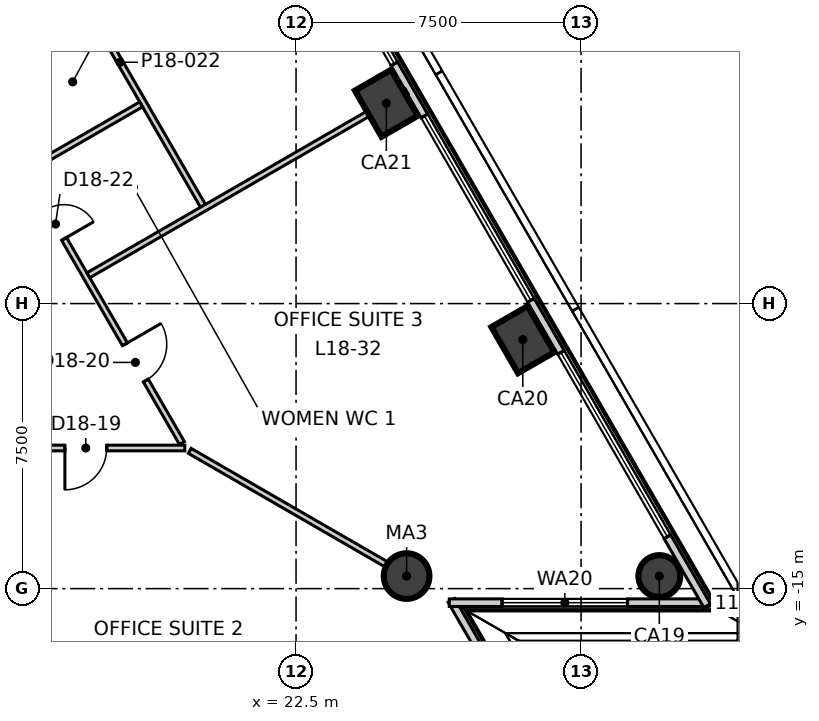
"""IFC4 building model, lengths in metres.
Left out: names, types, materials, properties, quantities, classifications, styles, units other than length and angle.
Written with IfcOpenShell. Run it as: python <this file> out.ifc"""

import sys

from ifc_helpers import new_model, si_unit, direction, frame, frame_2d, origin, origin_2d, place, context, subcontext, project, spatial, rectangle, circle, extrude, element, fill, save


model = new_model("IFC4")
c1 = context("Model", 3, precision=1e-05, world=origin(), true_north=direction((0.0, 1.0)))
c2 = subcontext(c1, "Body", "Model", "MODEL_VIEW")
j1 = project(units=[si_unit("LENGTHUNIT", "METRE"), si_unit("PLANEANGLEUNIT", "RADIAN")], contexts=[c1])
p1 = place(None, origin())
s1 = spatial("IfcSite", under=j1, at=p1, CompositionType="ELEMENT")
p2 = place(p1, origin())
s2 = spatial("IfcBuilding", under=s1, at=p2, CompositionType="ELEMENT")
p3 = place(p2, frame((0.0, 0.0, 83.3)))
s3 = spatial("IfcBuildingStorey", under=s2, at=p3, CompositionType="ELEMENT", Elevation=83.3)
p4 = place(p3, frame((32.059, -14.67, -0.3), z_axis=(0.0, 0.0, 1.0), x_axis=(-0.5, 0.866025403784, 0.0)))
e1 = element("IfcColumn", 1, at=p4, inside=s3, PredefinedType="COLUMN", context=c2, shape_type="SweptSolid", body=[
    extrude(circle(Radius=0.55, at=origin_2d()), origin(), (0.0, 0.0, 1.0), 4.0),
])
for number, where, z_axis, x_axis in (
    (2, (28.467, -8.449, -0.3), (0.0, 0.0, 1.0), (-0.5, 0.866, 0.0)),
    (3, (24.876, -2.228, -0.3), (0.0, 0.0, 1.0), (-0.5, 0.866, 0.0)),
):
    element("IfcColumn", number, at=place(p3, frame(where, z_axis=z_axis, x_axis=x_axis)), inside=s3, PredefinedType="COLUMN", context=c2, shape_type="SweptSolid", body=[
        extrude(rectangle(XDim=1.4, YDim=1.1, at=origin_2d()), origin(), (0.0, 0.0, 1.0), 4.0),
    ])
p5 = place(p3, frame((25.409, -14.67, -0.3), z_axis=(0.0, 0.0, 1.0), x_axis=(1.0, 0.0, 0.0)))
e4 = element("IfcColumn", 4, at=p5, inside=s3, PredefinedType="COLUMN", context=c2, shape_type="SweptSolid", body=[
    extrude(circle(Radius=0.6, at=origin_2d()), origin(), (0.0, 0.0, 1.0), 4.0),
])
p6 = place(p3, frame((29.992, -21.207, 0.0), z_axis=(0.0, 0.0, 1.0), x_axis=(-0.499983120418, 0.866035148996, 0.0)))
e5 = element("IfcWall", 5, at=p6, inside=s3, PredefinedType="ELEMENTEDWALL", context=c2, shape_type="SweptSolid", body=[
    extrude(rectangle(XDim=6.81, YDim=0.2, at=frame_2d((3.405, 0.0))), origin(), (0.0, 0.0, 1.0), 3.7),
])
p7 = place(p6, frame((1.99, 0.0, 0.9)))
e6 = element("IfcOpeningElement", 6, at=p7, cuts=e5, PredefinedType="OPENING", context=c2, shape_type="SweptSolid", body=[
    extrude(rectangle(XDim=3.3, YDim=2.5, at=frame_2d((1.65, 1.25))), frame((0.0, 0.11, 0.0), z_axis=(0.0, -1.0, 0.0), x_axis=(1.0, 0.0, 0.0)), (0.0, 0.0, 1.0), 0.22),
])
p8 = place(p3, frame((26.532, -15.37, 0.0), z_axis=(0.0, 0.0, 1.0), x_axis=(1.0, 0.0, 0.0)))
e7 = element("IfcWall", 7, at=p8, inside=s3, PredefinedType="ELEMENTEDWALL", context=c2, shape_type="SweptSolid", body=[
    extrude(rectangle(XDim=6.81, YDim=0.2, at=frame_2d((3.405, 0.0))), origin(), (0.0, 0.0, 1.0), 3.7),
])
p9 = place(p8, frame((1.39, 0.0, 0.9)))
e8 = element("IfcOpeningElement", 8, at=p9, cuts=e7, PredefinedType="OPENING", context=c2, shape_type="SweptSolid", body=[
    extrude(rectangle(XDim=3.3, YDim=2.5, at=frame_2d((1.65, 1.25))), frame((0.0, 0.11, 0.0), z_axis=(0.0, -1.0, 0.0), x_axis=(1.0, 0.0, 0.0)), (0.0, 0.0, 1.0), 0.22),
])
p10 = place(p3, frame((33.317, -15.448, 0.0), z_axis=(0.0, 0.0, 1.0), x_axis=(-0.499999874703, 0.866025476125, 0.0)))
e9 = element("IfcWall", 9, at=p10, inside=s3, PredefinedType="ELEMENTEDWALL", context=c2, shape_type="SweptSolid", body=[
    extrude(rectangle(XDim=60.054, YDim=0.2, at=frame_2d((30.027, 0.0))), origin(), (0.0, 0.0, 1.0), 3.7),
])
p11 = place(p10, frame((2.094, 0.0, 0.9)))
e10 = element("IfcOpeningElement", 10, at=p11, cuts=e9, PredefinedType="OPENING", context=c2, shape_type="SweptSolid", body=[
    extrude(rectangle(XDim=5.6, YDim=2.5, at=frame_2d((2.8, 1.25))), frame((0.0, 0.11, 0.0), z_axis=(0.0, -1.0, 0.0), x_axis=(1.0, 0.0, 0.0)), (0.0, 0.0, 1.0), 0.22),
])
p12 = place(p10, frame((9.278, 0.0, 0.9)))
e11 = element("IfcOpeningElement", 11, at=p12, cuts=e9, PredefinedType="OPENING", context=c2, shape_type="SweptSolid", body=[
    extrude(rectangle(XDim=5.6, YDim=2.5, at=frame_2d((2.8, 1.25))), frame((0.0, 0.11, 0.0), z_axis=(0.0, -1.0, 0.0), x_axis=(1.0, 0.0, 0.0)), (0.0, 0.0, 1.0), 0.22),
])
p13 = place(p10, frame((16.462, 0.0, 0.9)))
e12 = element("IfcOpeningElement", 12, at=p13, cuts=e9, PredefinedType="OPENING", context=c2, shape_type="SweptSolid", body=[
    extrude(rectangle(XDim=5.6, YDim=2.5, at=frame_2d((2.8, 1.25))), frame((0.0, 0.11, 0.0), z_axis=(0.0, -1.0, 0.0), x_axis=(1.0, 0.0, 0.0)), (0.0, 0.0, 1.0), 0.22),
])
p14 = place(p10, frame((23.645, 0.0, 0.9)))
e13 = element("IfcOpeningElement", 13, at=p14, cuts=e9, PredefinedType="OPENING", context=c2, shape_type="SweptSolid", body=[
    extrude(rectangle(XDim=5.6, YDim=2.5, at=frame_2d((2.8, 1.25))), frame((0.0, 0.11, 0.0), z_axis=(0.0, -1.0, 0.0), x_axis=(1.0, 0.0, 0.0)), (0.0, 0.0, 1.0), 0.22),
])
p15 = place(p10, frame((30.829, 0.0, 0.9)))
e14 = element("IfcOpeningElement", 14, at=p15, cuts=e9, PredefinedType="OPENING", context=c2, shape_type="SweptSolid", body=[
    extrude(rectangle(XDim=5.6, YDim=2.5, at=frame_2d((2.8, 1.25))), frame((0.0, 0.11, 0.0), z_axis=(0.0, -1.0, 0.0), x_axis=(1.0, 0.0, 0.0)), (0.0, 0.0, 1.0), 0.22),
])
p16 = place(p10, frame((38.012, 0.0, 0.9)))
e15 = element("IfcOpeningElement", 15, at=p16, cuts=e9, PredefinedType="OPENING", context=c2, shape_type="SweptSolid", body=[
    extrude(rectangle(XDim=5.6, YDim=2.5, at=frame_2d((2.8, 1.25))), frame((0.0, 0.11, 0.0), z_axis=(0.0, -1.0, 0.0), x_axis=(1.0, 0.0, 0.0)), (0.0, 0.0, 1.0), 0.22),
])
p17 = place(p10, frame((45.196, 0.0, 0.9)))
e16 = element("IfcOpeningElement", 16, at=p17, cuts=e9, PredefinedType="OPENING", context=c2, shape_type="SweptSolid", body=[
    extrude(rectangle(XDim=5.6, YDim=2.5, at=frame_2d((2.8, 1.25))), frame((0.0, 0.11, 0.0), z_axis=(0.0, -1.0, 0.0), x_axis=(1.0, 0.0, 0.0)), (0.0, 0.0, 1.0), 0.22),
])
p18 = place(p10, frame((52.379, 0.0, 0.9)))
e17 = element("IfcOpeningElement", 17, at=p18, cuts=e9, PredefinedType="OPENING", context=c2, shape_type="SweptSolid", body=[
    extrude(rectangle(XDim=5.6, YDim=2.5, at=frame_2d((2.8, 1.25))), frame((0.0, 0.11, 0.0), z_axis=(0.0, -1.0, 0.0), x_axis=(1.0, 0.0, 0.0)), (0.0, 0.0, 1.0), 0.22),
])
p19 = place(p3, frame((-19.422, -11.3, 0.0), z_axis=(0.0, 0.0, 1.0), x_axis=(1.0, 0.0, 0.0)))
e18 = element("IfcWall", 18, at=p19, inside=s3, PredefinedType="PARTITIONING", context=c2, shape_type="SweptSolid", body=[
    extrude(rectangle(XDim=38.994, YDim=0.15, at=frame_2d((19.497, 0.0))), origin(), (0.0, 0.0, 1.0), 3.7),
])
p20 = place(p19, frame((1.9, 0.0, 0.0)))
e19 = element("IfcOpeningElement", 19, at=p20, cuts=e18, PredefinedType="OPENING", context=c2, shape_type="SweptSolid", body=[
    extrude(rectangle(XDim=1.1, YDim=2.1, at=frame_2d((0.55, 1.05))), frame((0.0, 0.085, 0.0), z_axis=(0.0, -1.0, 0.0), x_axis=(1.0, 0.0, 0.0)), (0.0, 0.0, 1.0), 0.17),
])
p21 = place(p19, frame((11.705, 0.0, 0.0)))
e20 = element("IfcOpeningElement", 20, at=p21, cuts=e18, PredefinedType="OPENING", context=c2, shape_type="SweptSolid", body=[
    extrude(rectangle(XDim=1.1, YDim=2.1, at=frame_2d((0.55, 1.05))), frame((0.0, 0.085, 0.0), z_axis=(0.0, -1.0, 0.0), x_axis=(1.0, 0.0, 0.0)), (0.0, 0.0, 1.0), 0.17),
])
p22 = place(p19, frame((6.405, 0.0, 0.0)))
e21 = element("IfcOpeningElement", 21, at=p22, cuts=e18, PredefinedType="OPENING", context=c2, shape_type="SweptSolid", body=[
    extrude(rectangle(XDim=0.9, YDim=2.1, at=frame_2d((0.45, 1.05))), frame((0.0, 0.085, 0.0), z_axis=(0.0, -1.0, 0.0), x_axis=(1.0, 0.0, 0.0)), (0.0, 0.0, 1.0), 0.17),
])
p23 = place(p19, frame((9.405, 0.0, 0.0)))
e22 = element("IfcOpeningElement", 22, at=p23, cuts=e18, PredefinedType="OPENING", context=c2, shape_type="SweptSolid", body=[
    extrude(rectangle(XDim=0.9, YDim=2.1, at=frame_2d((0.45, 1.05))), frame((0.0, 0.085, 0.0), z_axis=(0.0, -1.0, 0.0), x_axis=(1.0, 0.0, 0.0)), (0.0, 0.0, 1.0), 0.17),
])
p24 = place(p19, frame((22.472, 0.0, 0.0)))
e23 = element("IfcOpeningElement", 23, at=p24, cuts=e18, PredefinedType="OPENING", context=c2, shape_type="SweptSolid", body=[
    extrude(rectangle(XDim=1.0, YDim=2.1, at=frame_2d((0.5, 1.05))), frame((0.0, 0.085, 0.0), z_axis=(0.0, -1.0, 0.0), x_axis=(1.0, 0.0, 0.0)), (0.0, 0.0, 1.0), 0.17),
])
p25 = place(p19, frame((29.656, 0.0, 0.0)))
e24 = element("IfcOpeningElement", 24, at=p25, cuts=e18, PredefinedType="OPENING", context=c2, shape_type="SweptSolid", body=[
    extrude(rectangle(XDim=1.0, YDim=2.1, at=frame_2d((0.5, 1.05))), frame((0.0, 0.085, 0.0), z_axis=(0.0, -1.0, 0.0), x_axis=(1.0, 0.0, 0.0)), (0.0, 0.0, 1.0), 0.17),
])
p26 = place(p19, frame((35.839, 0.0, 0.0)))
e25 = element("IfcOpeningElement", 25, at=p26, cuts=e18, PredefinedType="OPENING", context=c2, shape_type="SweptSolid", body=[
    extrude(rectangle(XDim=1.1, YDim=2.1, at=frame_2d((0.55, 1.05))), frame((0.0, 0.085, 0.0), z_axis=(0.0, -1.0, 0.0), x_axis=(1.0, 0.0, 0.0)), (0.0, 0.0, 1.0), 0.17),
])
p27 = place(p3, frame((19.702, -11.375, 0.0), z_axis=(0.0, 0.0, 1.0), x_axis=(0.866029956157, -0.499992114976, 0.0)))
e26 = element("IfcWall", 26, at=p27, inside=s3, PredefinedType="PARTITIONING", context=c2, shape_type="SweptSolid", body=[
    extrude(rectangle(XDim=7.21, YDim=0.15, at=frame_2d((3.605, 0.0))), origin(), (0.0, 0.0, 1.0), 3.15),
])
p28 = place(p3, frame((0.075, 22.47, 0.0), z_axis=(0.0, 0.0, 1.0), x_axis=(0.500002280369, -0.866024087209, 0.0)))
e27 = element("IfcWall", 27, at=p28, inside=s3, PredefinedType="PARTITIONING", context=c2, shape_type="SweptSolid", body=[
    extrude(rectangle(XDim=38.844, YDim=0.15, at=frame_2d((19.422, 0.0))), origin(), (0.0, 0.0, 1.0), 3.7),
])
p29 = place(p28, frame((35.844, 0.0, 0.0)))
e28 = element("IfcOpeningElement", 28, at=p29, cuts=e27, PredefinedType="OPENING", context=c2, shape_type="SweptSolid", body=[
    extrude(rectangle(XDim=1.1, YDim=2.1, at=frame_2d((0.55, 1.05))), frame((0.0, 0.085, 0.0), z_axis=(0.0, -1.0, 0.0), x_axis=(1.0, 0.0, 0.0)), (0.0, 0.0, 1.0), 0.17),
])
p30 = place(p28, frame((14.44, 0.0, 0.0)))
e29 = element("IfcOpeningElement", 29, at=p30, cuts=e27, PredefinedType="OPENING", context=c2, shape_type="SweptSolid", body=[
    extrude(rectangle(XDim=1.1, YDim=2.1, at=frame_2d((0.55, 1.05))), frame((0.0, 0.085, 0.0), z_axis=(0.0, -1.0, 0.0), x_axis=(1.0, 0.0, 0.0)), (0.0, 0.0, 1.0), 0.17),
])
p31 = place(p28, frame((31.74, 0.0, 0.0)))
e30 = element("IfcOpeningElement", 30, at=p31, cuts=e27, PredefinedType="OPENING", context=c2, shape_type="SweptSolid", body=[
    extrude(rectangle(XDim=0.9, YDim=2.1, at=frame_2d((0.45, 1.05))), frame((0.0, 0.085, 0.0), z_axis=(0.0, -1.0, 0.0), x_axis=(1.0, 0.0, 0.0)), (0.0, 0.0, 1.0), 0.17),
])
p32 = place(p28, frame((28.54, 0.0, 0.0)))
e31 = element("IfcOpeningElement", 31, at=p32, cuts=e27, PredefinedType="OPENING", context=c2, shape_type="SweptSolid", body=[
    extrude(rectangle(XDim=0.9, YDim=2.1, at=frame_2d((0.45, 1.05))), frame((0.0, 0.085, 0.0), z_axis=(0.0, -1.0, 0.0), x_axis=(1.0, 0.0, 0.0)), (0.0, 0.0, 1.0), 0.17),
])
p33 = place(p28, frame((25.74, 0.0, 0.0)))
e32 = element("IfcOpeningElement", 32, at=p33, cuts=e27, PredefinedType="OPENING", context=c2, shape_type="SweptSolid", body=[
    extrude(rectangle(XDim=1.0, YDim=2.1, at=frame_2d((0.5, 1.05))), frame((0.0, 0.085, 0.0), z_axis=(0.0, -1.0, 0.0), x_axis=(1.0, 0.0, 0.0)), (0.0, 0.0, 1.0), 0.17),
])
p34 = place(p28, frame((1.905, 0.0, 0.0)))
e33 = element("IfcOpeningElement", 33, at=p34, cuts=e27, PredefinedType="OPENING", context=c2, shape_type="SweptSolid", body=[
    extrude(rectangle(XDim=1.1, YDim=2.1, at=frame_2d((0.55, 1.05))), frame((0.0, 0.085, 0.0), z_axis=(0.0, -1.0, 0.0), x_axis=(1.0, 0.0, 0.0)), (0.0, 0.0, 1.0), 0.17),
])
p35 = place(p3, frame((15.688, 2.628, 0.0), z_axis=(0.0, 0.0, 1.0), x_axis=(0.499970334739, -0.866042530354, 0.0)))
e34 = element("IfcWall", 34, at=p35, inside=s3, PredefinedType="PARTITIONING", context=c2, shape_type="SweptSolid", body=[
    extrude(rectangle(XDim=8.725, YDim=0.15, at=frame_2d((4.362, 0.0))), origin(), (0.0, 0.0, 1.0), 3.7),
])
for number, where, z_axis, x_axis in (
    (35, (13.835, -1.213, 0.0), (0.0, 0.0, 1.0), (0.866, 0.5, 0.0)),
    (36, (15.435, -3.984, 0.0), (0.0, 0.0, 1.0), (0.866, 0.5, 0.0)),
):
    element("IfcWall", number, at=place(p3, frame(where, z_axis=z_axis, x_axis=x_axis)), inside=s3, PredefinedType="PARTITIONING", context=c2, shape_type="SweptSolid", body=[
        extrude(rectangle(XDim=3.45, YDim=0.15, at=frame_2d((1.725, 0.0))), origin(), (0.0, 0.0, 1.0), 3.7),
    ])
p36 = place(p3, frame((17.035, -6.755, 0.0), z_axis=(0.0, 0.0, 1.0), x_axis=(0.866035557451, 0.499982412921, 0.0)))
e37 = element("IfcWall", 37, at=p36, inside=s3, PredefinedType="PARTITIONING", context=c2, shape_type="SweptSolid", body=[
    extrude(rectangle(XDim=9.674, YDim=0.15, at=frame_2d((4.837, 0.0))), origin(), (0.0, 0.0, 1.0), 3.7),
])
p37 = place(p9, origin())
e38 = element("IfcWindow", 38, at=p37, inside=s3, PartitioningType="SINGLE_PANEL", PredefinedType="WINDOW", context=c2, shape_type="SweptSolid", body=[
    extrude(rectangle(XDim=3.3, YDim=2.5, at=frame_2d((1.65, 1.25))), frame((0.0, 0.03, 0.0), z_axis=(0.0, -1.0, 0.0), x_axis=(1.0, 0.0, 0.0)), (0.0, 0.0, 1.0), 0.06),
])
fill(e8, e38)
p38 = place(p11, origin())
e39 = element("IfcWindow", 39, at=p38, inside=s3, PartitioningType="SINGLE_PANEL", PredefinedType="WINDOW", context=c2, shape_type="SweptSolid", body=[
    extrude(rectangle(XDim=5.6, YDim=2.5, at=frame_2d((2.8, 1.25))), frame((0.0, 0.03, 0.0), z_axis=(0.0, -1.0, 0.0), x_axis=(1.0, 0.0, 0.0)), (0.0, 0.0, 1.0), 0.06),
])
fill(e10, e39)
p39 = place(p12, origin())
e40 = element("IfcWindow", 40, at=p39, inside=s3, PartitioningType="SINGLE_PANEL", PredefinedType="WINDOW", context=c2, shape_type="SweptSolid", body=[
    extrude(rectangle(XDim=5.6, YDim=2.5, at=frame_2d((2.8, 1.25))), frame((0.0, 0.03, 0.0), z_axis=(0.0, -1.0, 0.0), x_axis=(1.0, 0.0, 0.0)), (0.0, 0.0, 1.0), 0.06),
])
fill(e11, e40)
p40 = place(p13, origin())
e41 = element("IfcWindow", 41, at=p40, inside=s3, PartitioningType="SINGLE_PANEL", PredefinedType="WINDOW", context=c2, shape_type="SweptSolid", body=[
    extrude(rectangle(XDim=5.6, YDim=2.5, at=frame_2d((2.8, 1.25))), frame((0.0, 0.03, 0.0), z_axis=(0.0, -1.0, 0.0), x_axis=(1.0, 0.0, 0.0)), (0.0, 0.0, 1.0), 0.06),
])
fill(e12, e41)
p41 = place(p26, origin())
e42 = element("IfcDoor", 42, at=p41, inside=s3, OperationType="SINGLE_SWING_LEFT", PredefinedType="DOOR", context=c2, shape_type="SweptSolid", body=[
    extrude(rectangle(XDim=1.1, YDim=2.1, at=frame_2d((0.55, 1.05))), frame((0.0, 0.025, 0.0), z_axis=(0.0, -1.0, 0.0), x_axis=(1.0, 0.0, 0.0)), (0.0, 0.0, 1.0), 0.05),
])
fill(e25, e42)
p42 = place(p29, origin())
e43 = element("IfcDoor", 43, at=p42, inside=s3, OperationType="SINGLE_SWING_RIGHT", PredefinedType="DOOR", context=c2, shape_type="SweptSolid", body=[
    extrude(rectangle(XDim=1.1, YDim=2.1, at=frame_2d((0.55, 1.05))), frame((0.0, 0.025, 0.0), z_axis=(0.0, -1.0, 0.0), x_axis=(1.0, 0.0, 0.0)), (0.0, 0.0, 1.0), 0.05),
])
fill(e28, e43)
p43 = place(p31, origin())
e44 = element("IfcDoor", 44, at=p43, inside=s3, OperationType="SINGLE_SWING_LEFT", PredefinedType="DOOR", context=c2, shape_type="SweptSolid", body=[
    extrude(rectangle(XDim=0.9, YDim=2.1, at=frame_2d((0.45, 1.05))), frame((0.0, 0.025, 0.0), z_axis=(0.0, -1.0, 0.0), x_axis=(1.0, 0.0, 0.0)), (0.0, 0.0, 1.0), 0.05),
])
fill(e30, e44)
save(model, sys.argv[1])
